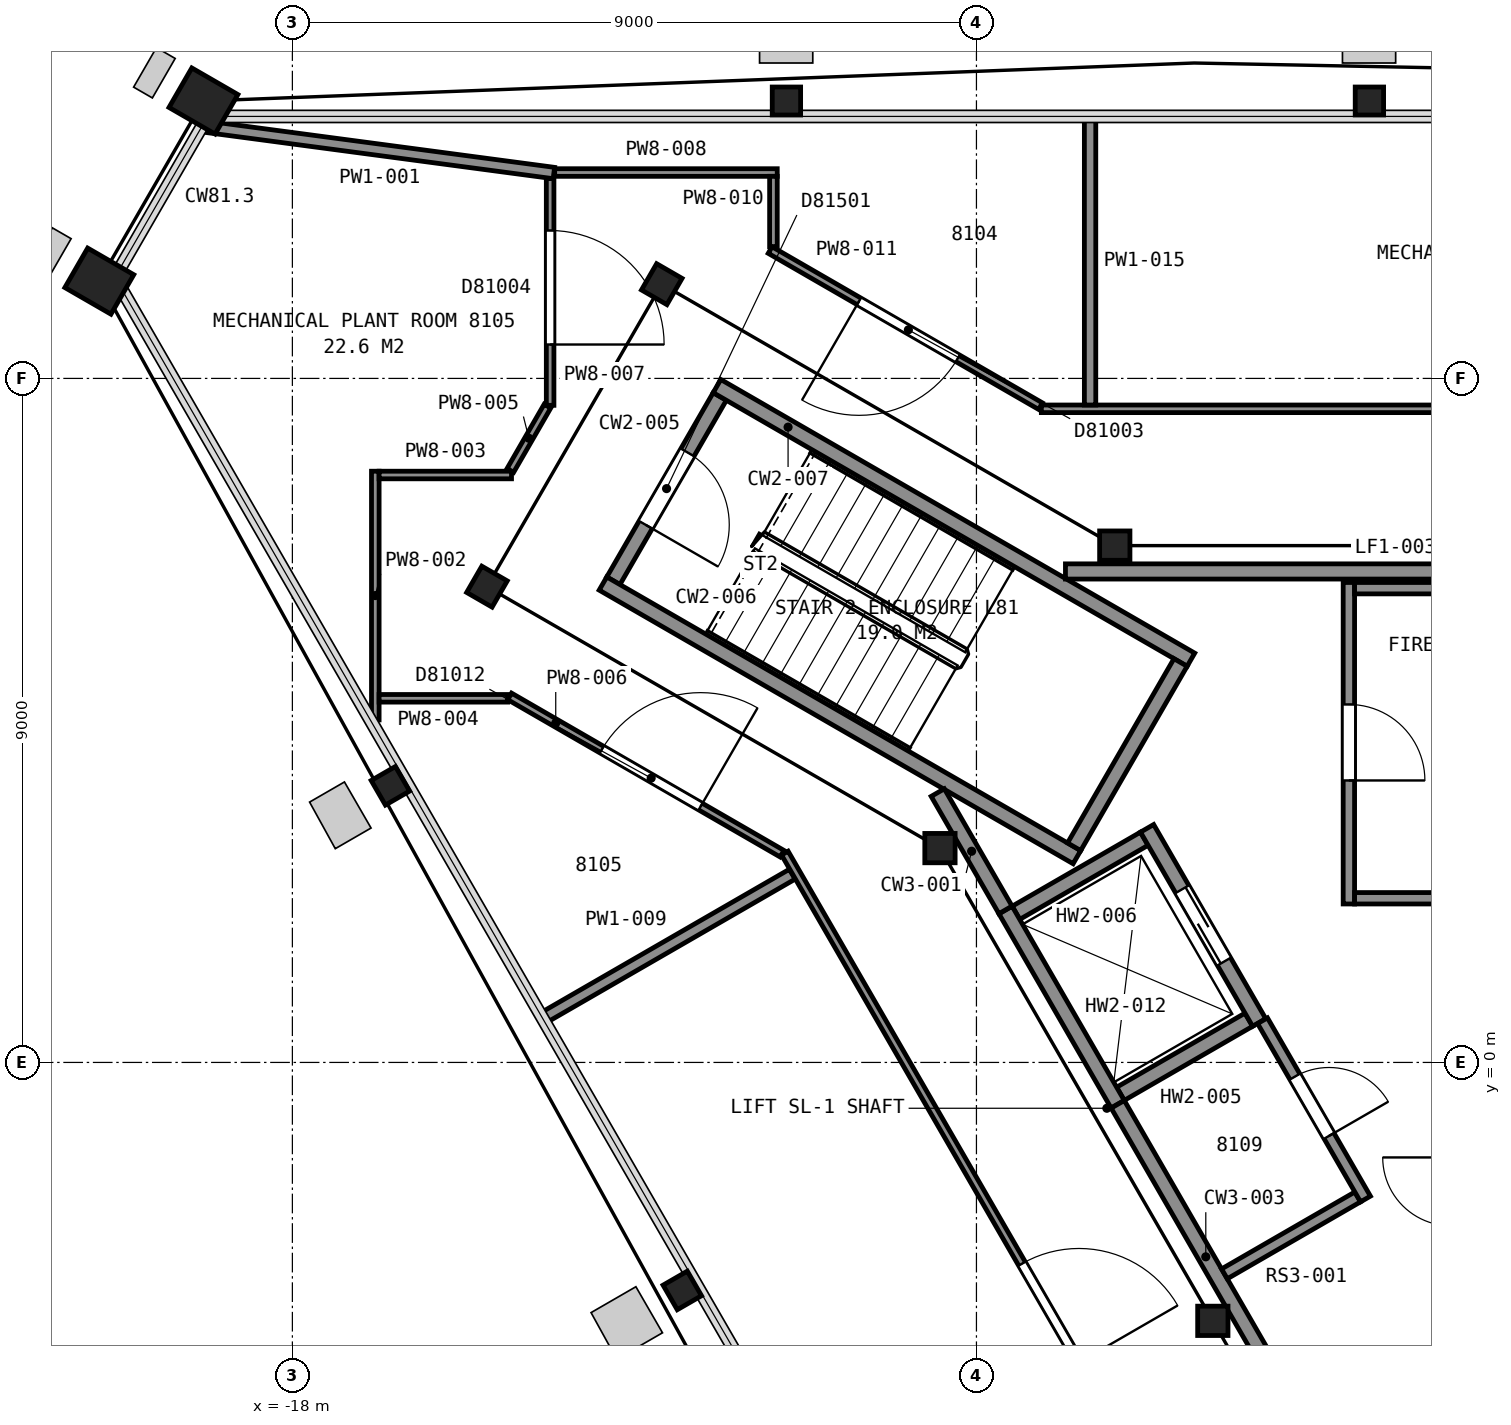
"""IFC4 building model, lengths in metres.
Left out: names, types, materials, properties, quantities, classifications, styles, units other than length and angle.
Written with IfcOpenShell. Run it as: python <this file> out.ifc"""

import sys

from ifc_helpers import new_model, si_unit, direction, frame, frame_2d, origin, origin_2d, place, context, subcontext, project, spatial, rectangle, hollow_rectangle, i_section, extrude, element, fill, save


model = new_model("IFC4")
c1 = context("Model", 3, precision=1e-05, world=origin(), true_north=direction((0.0, 1.0)))
c2 = subcontext(c1, "Body", "Model", "MODEL_VIEW")
j1 = project(units=[si_unit("LENGTHUNIT", "METRE"), si_unit("PLANEANGLEUNIT", "RADIAN")], contexts=[c1])
p1 = place(None, origin())
s1 = spatial("IfcSite", under=j1, at=p1, CompositionType="ELEMENT")
p2 = place(p1, origin())
s2 = spatial("IfcBuilding", under=s1, at=p2, CompositionType="ELEMENT")
p3 = place(p2, frame((0.0, 0.0, 321.0)))
s3 = spatial("IfcBuildingStorey", under=s2, at=p3, CompositionType="ELEMENT", Elevation=321.0)
for number, where, z_axis, x_axis in (
    (1, (-3.83, 12.65, 0.0), (0.0, 0.0, 1.0), (1.0, 0.0, 0.0)),
    (2, (-11.5, 12.65, 0.0), (0.0, 0.0, 1.0), (1.0, 0.0, 0.0)),
):
    element("IfcColumn", number, at=place(p3, frame(where, z_axis=z_axis, x_axis=x_axis)), inside=s3, PredefinedType="COLUMN", context=c2, shape_type="SweptSolid", body=[
        extrude(i_section(OverallWidth=0.373, OverallDepth=0.368, WebThickness=0.015, FlangeThickness=0.024, FilletRadius=0.015, at=origin_2d()), origin(), (0.0, 0.0, 1.0), 4.2),
    ])
for number, where, z_axis, x_axis in (
    (3, (-19.17, 12.65, 0.0), (0.0, 0.0, 1.0), (0.5, 0.866, 0.0)),
    (4, (-20.54, 10.28, 0.0), (0.0, 0.0, 1.0), (0.5, 0.866, 0.0)),
):
    element("IfcColumn", number, at=place(p3, frame(where, z_axis=z_axis, x_axis=x_axis)), inside=s3, PredefinedType="COLUMN", context=c2, shape_type="SweptSolid", body=[
        extrude(hollow_rectangle(XDim=0.6, YDim=0.7, WallThickness=0.04, at=origin_2d()), origin(), (0.0, 0.0, 1.0), 4.2),
    ])
for number, where, z_axis, x_axis in (
    (5, (-16.71, 3.64, 0.0), (0.0, 0.0, 1.0), (-0.5, 0.866, 0.0)),
    (6, (-12.87, -3.0, 0.0), (0.0, 0.0, 1.0), (-0.5, 0.866, 0.0)),
):
    element("IfcColumn", number, at=place(p3, frame(where, z_axis=z_axis, x_axis=x_axis)), inside=s3, PredefinedType="COLUMN", context=c2, shape_type="SweptSolid", body=[
        extrude(i_section(OverallWidth=0.373, OverallDepth=0.368, WebThickness=0.015, FlangeThickness=0.024, FilletRadius=0.015, at=origin_2d()), origin(), (0.0, 0.0, 1.0), 4.2),
    ])
for number, where, z_axis, x_axis in (
    (7, (-7.18, 6.8, 0.0), (0.0, 0.0, 1.0), (1.0, 0.0, 0.0)),
    (8, (-13.14, 10.24, 0.0), (0.0, 0.0, 1.0), (0.5, 0.866, 0.0)),
    (9, (-15.44, 6.26, 0.0), (0.0, 0.0, 1.0), (0.5, 0.866, 0.0)),
    (10, (-9.48, 2.82, 0.0), (0.0, 0.0, 1.0), (1.0, 0.0, 0.0)),
    (11, (-5.89, -3.4, 0.0), (0.0, 0.0, 1.0), (1.0, 0.0, 0.0)),
):
    element("IfcColumn", number, at=place(p3, frame(where, z_axis=z_axis, x_axis=x_axis)), inside=s3, PredefinedType="COLUMN", context=c2, shape_type="SweptSolid", body=[
        extrude(i_section(OverallWidth=0.399, OverallDepth=0.386, WebThickness=0.021, FlangeThickness=0.033, FilletRadius=0.015, at=origin_2d()), origin(), (0.0, 0.0, 1.0), 4.2),
    ])
p4 = place(p3, frame((-12.377, 8.762, 0.0), z_axis=(0.0, 0.0, 1.0), x_axis=(-0.500049511043, -0.865996816683, 0.0)))
e12 = element("IfcWall", 12, at=p4, inside=s3, PredefinedType="PARTITIONING", context=c2, shape_type="SweptSolid", body=[
    extrude(rectangle(XDim=2.8, YDim=0.2, at=frame_2d((1.4, 0.0))), origin(), (0.0, 0.0, 1.0), 3.95),
])
p5 = place(p4, frame((0.85, 0.0, 0.0)))
e13 = element("IfcOpeningElement", 13, at=p5, cuts=e12, PredefinedType="OPENING", context=c2, shape_type="SweptSolid", body=[
    extrude(rectangle(XDim=1.1, YDim=2.1, at=frame_2d((0.55, 1.05))), frame((0.0, 0.11, 0.0), z_axis=(0.0, -1.0, 0.0), x_axis=(1.0, 0.0, 0.0)), (0.0, 0.0, 1.0), 0.22),
])
for number, where, z_axis, x_axis in (
    (14, (-7.678, 2.701, 0.0), (0.0, 0.0, 1.0), (-0.866, 0.5, 0.0)),
    (15, (-6.178, 5.299, 0.0), (0.0, 0.0, 1.0), (-0.866, 0.5, 0.0)),
):
    element("IfcWall", number, at=place(p3, frame(where, z_axis=z_axis, x_axis=x_axis)), inside=s3, PredefinedType="PARTITIONING", context=c2, shape_type="SweptSolid", body=[
        extrude(rectangle(XDim=7.2, YDim=0.2, at=frame_2d((3.6, 0.0))), origin(), (0.0, 0.0, 1.0), 3.95),
    ])
p6 = place(p3, frame((-6.315, 5.262, 0.0), z_axis=(0.0, 0.0, 1.0), x_axis=(-0.500049511043, -0.865996816683, 0.0)))
e16 = element("IfcWall", 16, at=p6, inside=s3, PredefinedType="PARTITIONING", context=c2, shape_type="SweptSolid", body=[
    extrude(rectangle(XDim=2.8, YDim=0.2, at=frame_2d((1.4, 0.0))), origin(), (0.0, 0.0, 1.0), 3.95),
])
for number, where, z_axis, x_axis in (
    (17, (-7.105, -0.413, 0.0), (0.0, 0.0, 1.0), (0.866, 0.5, 0.0)),
    (18, (-8.48, 1.969, 0.0), (0.0, 0.0, 1.0), (0.866, 0.5, 0.0)),
):
    element("IfcWall", number, at=place(p3, frame(where, z_axis=z_axis, x_axis=x_axis)), inside=s3, PredefinedType="PARTITIONING", context=c2, shape_type="SweptSolid", body=[
        extrude(rectangle(XDim=1.95, YDim=0.2, at=frame_2d((0.975, 0.0))), origin(), (0.0, 0.0, 1.0), 4.2),
    ])
p7 = place(p3, frame((-5.28, 0.525, 0.0), z_axis=(0.0, 0.0, 1.0), x_axis=(-0.500037662692, 0.866003658127, 0.0)))
e19 = element("IfcWall", 19, at=p7, inside=s3, PredefinedType="PARTITIONING", context=c2, shape_type="SweptSolid", body=[
    extrude(rectangle(XDim=2.95, YDim=0.2, at=frame_2d((1.475, 0.0))), origin(), (0.0, 0.0, 1.0), 4.2),
])
p8 = place(p7, frame((0.925, 0.0, 0.0)))
e20 = element("IfcOpeningElement", 20, at=p8, cuts=e19, PredefinedType="OPENING", context=c2, shape_type="SweptSolid", body=[
    extrude(rectangle(XDim=1.1, YDim=2.1, at=frame_2d((0.55, 1.05))), frame((0.0, 0.11, 0.0), z_axis=(0.0, -1.0, 0.0), x_axis=(1.0, 0.0, 0.0)), (0.0, 0.0, 1.0), 0.22),
])
p9 = place(p3, frame((-7.142, -0.55, 0.0), z_axis=(0.0, 0.0, 1.0), x_axis=(-0.49997559174, 0.866039495442, 0.0)))
e21 = element("IfcWall", 21, at=p9, inside=s3, PredefinedType="PARTITIONING", context=c2, shape_type="SweptSolid", body=[
    extrude(rectangle(XDim=2.95, YDim=0.2, at=frame_2d((1.475, 0.0))), origin(), (0.0, 0.0, 1.0), 4.2),
])
p10 = place(p3, frame((-9.509, 3.551, 0.0), z_axis=(0.0, 0.0, 1.0), x_axis=(0.499999136801, -0.866025902152, 0.0)))
e22 = element("IfcWall", 22, at=p10, inside=s3, PredefinedType="PARTITIONING", context=c2, shape_type="SweptSolid", body=[
    extrude(rectangle(XDim=1.782, YDim=0.2, at=frame_2d((0.891, 0.0))), origin(), (0.0, 0.0, 1.0), 3.95),
])
p11 = place(p3, frame((7.829, 6.46, 0.0), z_axis=(0.0, 0.0, 1.0), x_axis=(-1.0, 0.0, 0.0)))
e23 = element("IfcWall", 23, at=p11, inside=s3, PredefinedType="PARTITIONING", context=c2, shape_type="SweptSolid", body=[
    extrude(rectangle(XDim=15.658, YDim=0.2, at=frame_2d((7.829, 0.0))), origin(), (0.0, 0.0, 1.0), 3.95),
])
p12 = place(p11, frame((2.618, 0.0, 0.0)))
e24 = element("IfcOpeningElement", 24, at=p12, cuts=e23, PredefinedType="OPENING", context=c2, shape_type="SweptSolid", body=[
    extrude(rectangle(XDim=1.8, YDim=2.1, at=frame_2d((0.9, 1.05))), frame((0.0, 0.11, 0.0), z_axis=(0.0, -1.0, 0.0), x_axis=(1.0, 0.0, 0.0)), (0.0, 0.0, 1.0), 0.22),
])
p13 = place(p3, frame((-7.141, -0.551, 0.0), z_axis=(0.0, 0.0, 1.0), x_axis=(0.499992795234, -0.866029563418, 0.0)))
e25 = element("IfcWall", 25, at=p13, inside=s3, PredefinedType="PARTITIONING", context=c2, shape_type="SweptSolid", body=[
    extrude(rectangle(XDim=9.198, YDim=0.2, at=frame_2d((4.599, 0.0))), origin(), (0.0, 0.0, 1.0), 3.95),
])
p14 = place(p13, frame((4.634, 0.0, 0.0)))
e26 = element("IfcOpeningElement", 26, at=p14, cuts=e25, PredefinedType="OPENING", context=c2, shape_type="SweptSolid", body=[
    extrude(rectangle(XDim=1.8, YDim=2.1, at=frame_2d((0.9, 1.05))), frame((0.0, 0.11, 0.0), z_axis=(0.0, -1.0, 0.0), x_axis=(1.0, 0.0, 0.0)), (0.0, 0.0, 1.0), 0.22),
])
p15 = place(p3, frame((-5.737, -2.782, 0.0), z_axis=(0.0, 0.0, 1.0), x_axis=(0.866000843773, 0.500042536776, 0.0)))
e27 = element("IfcWall", 27, at=p15, inside=s3, PredefinedType="PARTITIONING", context=c2, shape_type="SweptSolid", body=[
    extrude(rectangle(XDim=2.025, YDim=0.15, at=frame_2d((1.012, 0.0))), origin(), (0.0, 0.0, 1.0), 3.95),
])
p16 = place(p3, frame((-3.882, -1.797, 0.0), z_axis=(0.0, 0.0, 1.0), x_axis=(-0.500016307898, 0.86601598821, 0.0)))
e28 = element("IfcWall", 28, at=p16, inside=s3, PredefinedType="PARTITIONING", context=c2, shape_type="SweptSolid", body=[
    extrude(rectangle(XDim=2.709, YDim=0.15, at=frame_2d((1.354, 0.0))), origin(), (0.0, 0.0, 1.0), 3.95),
])
p17 = place(p16, frame((0.959, 0.0, 0.0)))
e29 = element("IfcOpeningElement", 29, at=p17, cuts=e28, PredefinedType="OPENING", context=c2, shape_type="SweptSolid", body=[
    extrude(rectangle(XDim=0.9, YDim=2.1, at=frame_2d((0.45, 1.05))), frame((0.0, 0.085, 0.0), z_axis=(0.0, -1.0, 0.0), x_axis=(1.0, 0.0, 0.0)), (0.0, 0.0, 1.0), 0.17),
])
p18 = place(p3, frame((-4.1, 2.085, 0.0), z_axis=(0.0, 0.0, 1.0), x_axis=(0.0, 1.0, 0.0)))
e30 = element("IfcWall", 30, at=p18, inside=s3, PredefinedType="PARTITIONING", context=c2, shape_type="SweptSolid", body=[
    extrude(rectangle(XDim=4.23, YDim=0.15, at=frame_2d((2.115, 0.0))), origin(), (0.0, 0.0, 1.0), 3.95),
])
p19 = place(p18, frame((1.625, 0.0, 0.0)))
e31 = element("IfcOpeningElement", 31, at=p19, cuts=e30, PredefinedType="OPENING", context=c2, shape_type="SweptSolid", body=[
    extrude(rectangle(XDim=1.0, YDim=2.1, at=frame_2d((0.5, 1.05))), frame((0.0, 0.085, 0.0), z_axis=(0.0, -1.0, 0.0), x_axis=(1.0, 0.0, 0.0)), (0.0, 0.0, 1.0), 0.17),
])
p20 = place(p3, frame((-4.025, 2.16, 0.0), z_axis=(0.0, 0.0, 1.0), x_axis=(1.0, 0.0, 0.0)))
e32 = element("IfcWall", 32, at=p20, inside=s3, PredefinedType="PARTITIONING", context=c2, shape_type="SweptSolid", body=[
    extrude(rectangle(XDim=1.238, YDim=0.15, at=frame_2d((0.619, 0.0))), origin(), (0.0, 0.0, 1.0), 3.95),
])
p21 = place(p3, frame((-4.025, 6.24, 0.0), z_axis=(0.0, 0.0, 1.0), x_axis=(1.0, 0.0, 0.0)))
e33 = element("IfcWall", 33, at=p21, inside=s3, PredefinedType="PARTITIONING", context=c2, shape_type="SweptSolid", body=[
    extrude(rectangle(XDim=3.63, YDim=0.15, at=frame_2d((1.815, 0.0))), origin(), (0.0, 0.0, 1.0), 3.95),
])
p22 = place(p3, frame((-19.143, 12.312, 0.0), z_axis=(0.0, 0.0, 1.0), x_axis=(0.991256927963, -0.131945832693, 0.0)))
e34 = element("IfcWall", 34, at=p22, inside=s3, PredefinedType="PARTITIONING", context=c2, shape_type="SweptSolid", body=[
    extrude(rectangle(XDim=4.624, YDim=0.15, at=frame_2d((2.312, 0.0))), origin(), (0.0, 0.0, 1.0), 3.297),
])
p23 = place(p3, frame((-16.909, 4.507, 0.0), z_axis=(0.0, 0.0, 1.0), x_axis=(0.0, 1.0, 0.0)))
e35 = element("IfcWall", 35, at=p23, inside=s3, PredefinedType="PARTITIONING", context=c2, shape_type="SweptSolid", body=[
    extrude(rectangle(XDim=3.272, YDim=0.1, at=frame_2d((1.636, 0.0))), origin(), (0.0, 0.0, 1.0), 3.297),
])
p24 = place(p3, frame((-16.859, 7.729, 0.0), z_axis=(0.0, 0.0, 1.0), x_axis=(1.0, 0.0, 0.0)))
e36 = element("IfcWall", 36, at=p24, inside=s3, PredefinedType="PARTITIONING", context=c2, shape_type="SweptSolid", body=[
    extrude(rectangle(XDim=1.742, YDim=0.1, at=frame_2d((0.871, 0.0))), origin(), (0.0, 0.0, 1.0), 3.297),
])
p25 = place(p3, frame((-16.859, 4.791, 0.0), z_axis=(0.0, 0.0, 1.0), x_axis=(1.0, 0.0, 0.0)))
e37 = element("IfcWall", 37, at=p25, inside=s3, PredefinedType="PARTITIONING", context=c2, shape_type="SweptSolid", body=[
    extrude(rectangle(XDim=1.691, YDim=0.1, at=frame_2d((0.845, 0.0))), origin(), (0.0, 0.0, 1.0), 3.297),
])
p26 = place(p3, frame((-15.132, 7.79, 0.0), z_axis=(0.0, 0.0, 1.0), x_axis=(0.499823463829, 0.866127303003, 0.0)))
e38 = element("IfcWall", 38, at=p26, inside=s3, PredefinedType="PARTITIONING", context=c2, shape_type="SweptSolid", body=[
    extrude(rectangle(XDim=0.976, YDim=0.1, at=frame_2d((0.488, 0.0))), origin(), (0.0, 0.0, 1.0), 3.297),
])
p27 = place(p3, frame((-11.557, 2.746, 0.0), z_axis=(0.0, 0.0, 1.0), x_axis=(-0.866005840187, 0.500033883614, 0.0)))
e39 = element("IfcWall", 39, at=p27, inside=s3, PredefinedType="PARTITIONING", context=c2, shape_type="SweptSolid", body=[
    extrude(rectangle(XDim=4.139, YDim=0.1, at=frame_2d((2.07, 0.0))), origin(), (0.0, 0.0, 1.0), 3.297),
])
p28 = place(p27, frame((1.24, 0.0, 0.0)))
e40 = element("IfcOpeningElement", 40, at=p28, cuts=e39, PredefinedType="OPENING", context=c2, shape_type="SweptSolid", body=[
    extrude(rectangle(XDim=1.5, YDim=2.1, at=frame_2d((0.75, 1.05))), frame((0.0, 0.06, 0.0), z_axis=(0.0, -1.0, 0.0), x_axis=(1.0, 0.0, 0.0)), (0.0, 0.0, 1.0), 0.12),
])
p29 = place(p3, frame((-14.609, 8.646, 0.0), z_axis=(0.0, 0.0, 1.0), x_axis=(0.0, 1.0, 0.0)))
e41 = element("IfcWall", 41, at=p29, inside=s3, PredefinedType="PARTITIONING", context=c2, shape_type="SweptSolid", body=[
    extrude(rectangle(XDim=2.983, YDim=0.1, at=frame_2d((1.491, 0.0))), origin(), (0.0, 0.0, 1.0), 3.297),
])
p30 = place(p29, frame((0.8, 0.0, 0.0)))
e42 = element("IfcOpeningElement", 42, at=p30, cuts=e41, PredefinedType="OPENING", context=c2, shape_type="SweptSolid", body=[
    extrude(rectangle(XDim=1.5, YDim=2.1, at=frame_2d((0.75, 1.05))), frame((0.0, 0.06, 0.0), z_axis=(0.0, -1.0, 0.0), x_axis=(1.0, 0.0, 0.0)), (0.0, 0.0, 1.0), 0.12),
])
p31 = place(p3, frame((-14.549, 11.709, 0.0), z_axis=(0.0, 0.0, 1.0), x_axis=(1.0, 0.0, 0.0)))
e43 = element("IfcWall", 43, at=p31, inside=s3, PredefinedType="PARTITIONING", context=c2, shape_type="SweptSolid", body=[
    extrude(rectangle(XDim=2.928, YDim=0.1, at=frame_2d((1.464, 0.0))), origin(), (0.0, 0.0, 1.0), 3.297),
])
p32 = place(p3, frame((-14.696, 0.588, 0.0), z_axis=(0.0, 0.0, 1.0), x_axis=(0.866115649152, 0.499843657852, 0.0)))
e44 = element("IfcWall", 44, at=p32, inside=s3, PredefinedType="PARTITIONING", context=c2, shape_type="SweptSolid", body=[
    extrude(rectangle(XDim=3.778, YDim=0.15, at=frame_2d((1.889, 0.0))), origin(), (0.0, 0.0, 1.0), 3.297),
])
p33 = place(p3, frame((-11.671, 10.734, 0.0), z_axis=(0.0, 0.0, 1.0), x_axis=(0.0, 1.0, 0.0)))
e45 = element("IfcWall", 45, at=p33, inside=s3, PredefinedType="PARTITIONING", context=c2, shape_type="SweptSolid", body=[
    extrude(rectangle(XDim=0.925, YDim=0.1, at=frame_2d((0.462, 0.0))), origin(), (0.0, 0.0, 1.0), 3.297),
])
p34 = place(p3, frame((-11.714, 10.689, 0.0), z_axis=(0.0, 0.0, 1.0), x_axis=(0.866029215606, -0.499993397673, 0.0)))
e46 = element("IfcWall", 46, at=p34, inside=s3, PredefinedType="PARTITIONING", context=c2, shape_type="SweptSolid", body=[
    extrude(rectangle(XDim=4.108, YDim=0.1, at=frame_2d((2.054, 0.0))), origin(), (0.0, 0.0, 1.0), 3.297),
])
p35 = place(p34, frame((1.35, 0.0, 0.0)))
e47 = element("IfcOpeningElement", 47, at=p35, cuts=e46, PredefinedType="OPENING", context=c2, shape_type="SweptSolid", body=[
    extrude(rectangle(XDim=1.5, YDim=2.1, at=frame_2d((0.75, 1.05))), frame((0.0, 0.06, 0.0), z_axis=(0.0, -1.0, 0.0), x_axis=(1.0, 0.0, 0.0)), (0.0, 0.0, 1.0), 0.12),
])
p36 = place(p3, frame((-3.744, -10.714, 0.0), z_axis=(0.0, 0.0, 1.0), x_axis=(-0.500044034969, 0.86599997869, 0.0)))
e48 = element("IfcWall", 48, at=p36, inside=s3, PredefinedType="PARTITIONING", context=c2, shape_type="SweptSolid", body=[
    extrude(rectangle(XDim=15.553, YDim=0.1, at=frame_2d((7.776, 0.0))), origin(), (0.0, 0.0, 1.0), 3.297),
])
p37 = place(p36, frame((7.814, 0.0, 0.0)))
e49 = element("IfcOpeningElement", 49, at=p37, cuts=e48, PredefinedType="OPENING", context=c2, shape_type="SweptSolid", body=[
    extrude(rectangle(XDim=1.5, YDim=2.1, at=frame_2d((0.75, 1.05))), frame((0.0, 0.06, 0.0), z_axis=(0.0, -1.0, 0.0), x_axis=(1.0, 0.0, 0.0)), (0.0, 0.0, 1.0), 0.12),
])
p38 = place(p3, frame((-8.146, 8.6, 0.0), z_axis=(0.0, 0.0, 1.0), x_axis=(1.0, 0.0, 0.0)))
e50 = element("IfcWall", 50, at=p38, inside=s3, PredefinedType="PARTITIONING", context=c2, shape_type="SweptSolid", body=[
    extrude(rectangle(XDim=16.292, YDim=0.1, at=frame_2d((8.146, 0.0))), origin(), (0.0, 0.0, 1.0), 3.297),
])
p39 = place(p38, frame((13.462, 0.0, 0.0)))
e51 = element("IfcOpeningElement", 51, at=p39, cuts=e50, PredefinedType="OPENING", context=c2, shape_type="SweptSolid", body=[
    extrude(rectangle(XDim=1.5, YDim=2.1, at=frame_2d((0.75, 1.05))), frame((0.0, 0.06, 0.0), z_axis=(0.0, -1.0, 0.0), x_axis=(1.0, 0.0, 0.0)), (0.0, 0.0, 1.0), 0.12),
])
p40 = place(p38, frame((5.641, 0.0, 0.0)))
e52 = element("IfcOpeningElement", 52, at=p40, cuts=e50, PredefinedType="OPENING", context=c2, shape_type="SweptSolid", body=[
    extrude(rectangle(XDim=1.5, YDim=2.1, at=frame_2d((0.75, 1.05))), frame((0.0, 0.06, 0.0), z_axis=(0.0, -1.0, 0.0), x_axis=(1.0, 0.0, 0.0)), (0.0, 0.0, 1.0), 0.12),
])
p41 = place(p3, frame((-7.505, 8.65, 0.0), z_axis=(0.0, 0.0, 1.0), x_axis=(0.0, 1.0, 0.0)))
e53 = element("IfcWall", 53, at=p41, inside=s3, PredefinedType="PARTITIONING", context=c2, shape_type="SweptSolid", body=[
    extrude(rectangle(XDim=3.783, YDim=0.15, at=frame_2d((1.892, 0.0))), origin(), (0.0, 0.0, 1.0), 3.297),
])
p42 = place(p5, origin())
e54 = element("IfcDoor", 54, at=p42, inside=s3, OperationType="SINGLE_SWING_RIGHT", PredefinedType="DOOR", context=c2, shape_type="SweptSolid", body=[
    extrude(rectangle(XDim=1.1, YDim=2.1, at=frame_2d((0.55, 1.05))), frame((0.0, 0.025, 0.0), z_axis=(0.0, -1.0, 0.0), x_axis=(1.0, 0.0, 0.0)), (0.0, 0.0, 1.0), 0.05),
])
fill(e13, e54)
p43 = place(p8, origin())
e55 = element("IfcDoor", 55, at=p43, inside=s3, OperationType="SLIDING_TO_LEFT", PredefinedType="DOOR", context=c2, shape_type="SweptSolid", body=[
    extrude(rectangle(XDim=1.1, YDim=2.1, at=frame_2d((0.55, 1.05))), frame((0.0, 0.025, 0.0), z_axis=(0.0, -1.0, 0.0), x_axis=(1.0, 0.0, 0.0)), (0.0, 0.0, 1.0), 0.05),
])
fill(e20, e55)
p44 = place(p17, origin())
e56 = element("IfcDoor", 56, at=p44, inside=s3, OperationType="SINGLE_SWING_LEFT", PredefinedType="DOOR", context=c2, shape_type="SweptSolid", body=[
    extrude(rectangle(XDim=0.9, YDim=2.1, at=frame_2d((0.45, 1.05))), frame((0.0, 0.025, 0.0), z_axis=(0.0, -1.0, 0.0), x_axis=(1.0, 0.0, 0.0)), (0.0, 0.0, 1.0), 0.05),
])
fill(e29, e56)
p45 = place(p19, origin())
e57 = element("IfcDoor", 57, at=p45, inside=s3, OperationType="SINGLE_SWING_LEFT", PredefinedType="DOOR", context=c2, shape_type="SweptSolid", body=[
    extrude(rectangle(XDim=1.0, YDim=2.1, at=frame_2d((0.5, 1.05))), frame((0.0, 0.025, 0.0), z_axis=(0.0, -1.0, 0.0), x_axis=(1.0, 0.0, 0.0)), (0.0, 0.0, 1.0), 0.05),
])
fill(e31, e57)
p46 = place(p28, origin())
e58 = element("IfcDoor", 58, at=p46, inside=s3, OperationType="DOUBLE_DOOR_SINGLE_SWING", PredefinedType="DOOR", context=c2, shape_type="SweptSolid", body=[
    extrude(rectangle(XDim=1.5, YDim=2.1, at=frame_2d((0.75, 1.05))), frame((0.0, 0.025, 0.0), z_axis=(0.0, -1.0, 0.0), x_axis=(1.0, 0.0, 0.0)), (0.0, 0.0, 1.0), 0.05),
])
fill(e40, e58)
p47 = place(p30, origin())
e59 = element("IfcDoor", 59, at=p47, inside=s3, OperationType="DOUBLE_DOOR_SINGLE_SWING", PredefinedType="DOOR", context=c2, shape_type="SweptSolid", body=[
    extrude(rectangle(XDim=1.5, YDim=2.1, at=frame_2d((0.75, 1.05))), frame((0.0, 0.025, 0.0), z_axis=(0.0, -1.0, 0.0), x_axis=(1.0, 0.0, 0.0)), (0.0, 0.0, 1.0), 0.05),
])
fill(e42, e59)
p48 = place(p35, origin())
e60 = element("IfcDoor", 60, at=p48, inside=s3, OperationType="DOUBLE_DOOR_SINGLE_SWING", PredefinedType="DOOR", context=c2, shape_type="SweptSolid", body=[
    extrude(rectangle(XDim=1.5, YDim=2.1, at=frame_2d((0.75, 1.05))), frame((0.0, 0.025, 0.0), z_axis=(0.0, -1.0, 0.0), x_axis=(1.0, 0.0, 0.0)), (0.0, 0.0, 1.0), 0.05),
])
fill(e47, e60)
p49 = place(p37, origin())
e61 = element("IfcDoor", 61, at=p49, inside=s3, OperationType="DOUBLE_DOOR_SINGLE_SWING", PredefinedType="DOOR", context=c2, shape_type="SweptSolid", body=[
    extrude(rectangle(XDim=1.5, YDim=2.1, at=frame_2d((0.75, 1.05))), frame((0.0, 0.025, 0.0), z_axis=(0.0, -1.0, 0.0), x_axis=(1.0, 0.0, 0.0)), (0.0, 0.0, 1.0), 0.05),
])
fill(e49, e61)
save(model, sys.argv[1])
